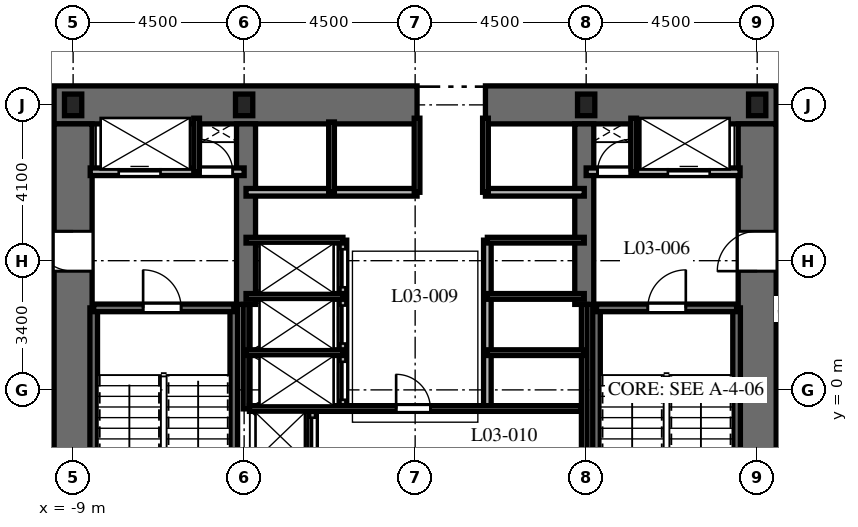
"""IFC4 building model, lengths in metres.
Left out: names, types, materials, properties, quantities, classifications, styles, units other than length and angle.
Written with IfcOpenShell. Run it as: python <this file> out.ifc"""

import sys

from ifc_helpers import new_model, si_unit, direction, frame, frame_2d, origin, origin_2d, place, context, subcontext, project, spatial, rectangle, i_section, extrude, element, fill, save


model = new_model("IFC4")
c1 = context("Model", 3, precision=1e-05, world=origin(), true_north=direction((0.0, 1.0)))
c2 = subcontext(c1, "Body", "Model", "MODEL_VIEW")
j1 = project(units=[si_unit("LENGTHUNIT", "METRE"), si_unit("PLANEANGLEUNIT", "RADIAN")], contexts=[c1])
p1 = place(None, origin())
s1 = spatial("IfcSite", under=j1, at=p1, CompositionType="ELEMENT")
p2 = place(p1, origin())
s2 = spatial("IfcBuilding", under=s1, at=p2, CompositionType="ELEMENT")
p3 = place(p2, frame((0.0, 0.0, 18.6)))
s3 = spatial("IfcBuildingStorey", under=s2, at=p3, CompositionType="ELEMENT", Elevation=18.6)
p4 = place(p3, frame((-9.5, 7.5, 0.0), z_axis=(0.0, 0.0, 1.0), x_axis=(1.0, 0.0, 0.0)))
e1 = element("IfcWall", 1, at=p4, inside=s3, PredefinedType="SHEAR", context=c2, shape_type="SweptSolid", body=[
    extrude(rectangle(XDim=9.55, YDim=1.0, at=frame_2d((4.775, 0.0))), origin(), (0.0, 0.0, 1.0), 4.8),
])
p5 = place(p3, frame((1.85, 7.5, 0.0), z_axis=(0.0, 0.0, 1.0), x_axis=(1.0, 0.0, 0.0)))
e2 = element("IfcWall", 2, at=p5, inside=s3, PredefinedType="SHEAR", context=c2, shape_type="SweptSolid", body=[
    extrude(rectangle(XDim=7.65, YDim=1.0, at=frame_2d((3.825, 0.0))), origin(), (0.0, 0.0, 1.0), 4.8),
])
p6 = place(p3, frame((-9.0, -7.0, 0.0), z_axis=(0.0, 0.0, 1.0), x_axis=(0.0, 1.0, 0.0)))
e3 = element("IfcWall", 3, at=p6, inside=s3, PredefinedType="SHEAR", context=c2, shape_type="SweptSolid", body=[
    extrude(rectangle(XDim=14.0, YDim=1.0, at=frame_2d((7.0, 0.0))), origin(), (0.0, 0.0, 1.0), 4.8),
])
p7 = place(p6, frame((10.125, 0.0, 0.0)))
e4 = element("IfcOpeningElement", 4, at=p7, cuts=e3, PredefinedType="OPENING", context=c2, shape_type="SweptSolid", body=[
    extrude(rectangle(XDim=1.05, YDim=2.15, at=frame_2d((0.525, 1.075))), frame((0.0, 0.51, 0.0), z_axis=(0.0, -1.0, 0.0), x_axis=(1.0, 0.0, 0.0)), (0.0, 0.0, 1.0), 1.02),
])
p8 = place(p3, frame((9.0, -7.0, 0.0), z_axis=(0.0, 0.0, 1.0), x_axis=(0.0, 1.0, 0.0)))
e5 = element("IfcWall", 5, at=p8, inside=s3, PredefinedType="SHEAR", context=c2, shape_type="SweptSolid", body=[
    extrude(rectangle(XDim=14.0, YDim=1.0, at=frame_2d((7.0, 0.0))), origin(), (0.0, 0.0, 1.0), 4.8),
])
p9 = place(p8, frame((10.125, 0.0, 0.0)))
e6 = element("IfcOpeningElement", 6, at=p9, cuts=e5, PredefinedType="OPENING", context=c2, shape_type="SweptSolid", body=[
    extrude(rectangle(XDim=1.05, YDim=2.15, at=frame_2d((0.525, 1.075))), frame((0.0, 0.51, 0.0), z_axis=(0.0, -1.0, 0.0), x_axis=(1.0, 0.0, 0.0)), (0.0, 0.0, 1.0), 1.02),
])
for number, where, z_axis, x_axis in (
    (7, (-4.45, 2.25, 0.0), (0.0, 0.0, 1.0), (0.0, 1.0, 0.0)),
    (8, (4.45, 2.25, 0.0), (0.0, 0.0, 1.0), (0.0, 1.0, 0.0)),
):
    element("IfcWall", number, at=place(p3, frame(where, z_axis=z_axis, x_axis=x_axis)), inside=s3, PredefinedType="SHEAR", context=c2, shape_type="SweptSolid", body=[
        extrude(rectangle(XDim=4.75, YDim=0.5, at=frame_2d((2.375, 0.0))), origin(), (0.0, 0.0, 1.0), 4.8),
    ])
for number, where, z_axis, x_axis in (
    (9, (-8.458, -6.985, 0.0), (0.0, 0.0, 1.0), (0.0, 1.0, 0.0)),
    (10, (-4.772, -6.985, 0.0), (0.0, 0.0, 1.0), (0.0, 1.0, 0.0)),
):
    element("IfcWall", number, at=place(p3, frame(where, z_axis=z_axis, x_axis=x_axis)), inside=s3, PredefinedType="SHEAR", context=c2, shape_type="SweptSolid", body=[
        extrude(rectangle(XDim=9.143, YDim=0.2, at=frame_2d((4.572, 0.0))), origin(), (0.0, 0.0, 1.0), 4.8),
    ])
p10 = place(p3, frame((-8.458, 2.158, 0.0), z_axis=(0.0, 0.0, 1.0), x_axis=(1.0, 0.0, 0.0)))
e11 = element("IfcWall", 11, at=p10, inside=s3, PredefinedType="SHEAR", context=c2, shape_type="SweptSolid", body=[
    extrude(rectangle(XDim=3.686, YDim=0.2, at=frame_2d((1.843, 0.0))), origin(), (0.0, 0.0, 1.0), 4.8),
])
p11 = place(p10, frame((1.3, 0.0, 0.0)))
e12 = element("IfcOpeningElement", 12, at=p11, cuts=e11, PredefinedType="OPENING", context=c2, shape_type="SweptSolid", body=[
    extrude(rectangle(XDim=1.0, YDim=2.15, at=frame_2d((0.5, 1.075))), frame((0.0, 0.11, 0.0), z_axis=(0.0, -1.0, 0.0), x_axis=(1.0, 0.0, 0.0)), (0.0, 0.0, 1.0), 0.22),
])
for number, where, z_axis, x_axis in (
    (13, (4.772, -6.985, 0.0), (0.0, 0.0, 1.0), (0.0, 1.0, 0.0)),
    (14, (8.458, -6.985, 0.0), (0.0, 0.0, 1.0), (0.0, 1.0, 0.0)),
):
    element("IfcWall", number, at=place(p3, frame(where, z_axis=z_axis, x_axis=x_axis)), inside=s3, PredefinedType="SHEAR", context=c2, shape_type="SweptSolid", body=[
        extrude(rectangle(XDim=9.143, YDim=0.2, at=frame_2d((4.572, 0.0))), origin(), (0.0, 0.0, 1.0), 4.8),
    ])
p12 = place(p3, frame((4.772, 2.158, 0.0), z_axis=(0.0, 0.0, 1.0), x_axis=(1.0, 0.0, 0.0)))
e15 = element("IfcWall", 15, at=p12, inside=s3, PredefinedType="SHEAR", context=c2, shape_type="SweptSolid", body=[
    extrude(rectangle(XDim=3.686, YDim=0.2, at=frame_2d((1.843, 0.0))), origin(), (0.0, 0.0, 1.0), 4.8),
])
p13 = place(p12, frame((1.35, 0.0, 0.0)))
e16 = element("IfcOpeningElement", 16, at=p13, cuts=e15, PredefinedType="OPENING", context=c2, shape_type="SweptSolid", body=[
    extrude(rectangle(XDim=1.0, YDim=2.15, at=frame_2d((0.5, 1.075))), frame((0.0, 0.11, 0.0), z_axis=(0.0, -1.0, 0.0), x_axis=(1.0, 0.0, 0.0)), (0.0, 0.0, 1.0), 0.22),
])
for number, where, z_axis, x_axis in (
    (17, (9.0, 7.5, 0.0), (0.0, 0.0, 1.0), (1.0, 0.0, 0.0)),
    (18, (4.5, 7.5, 0.0), (0.0, 0.0, 1.0), (1.0, 0.0, 0.0)),
    (19, (-4.5, 7.5, 0.0), (0.0, 0.0, 1.0), (1.0, 0.0, 0.0)),
    (20, (-9.0, 7.5, 0.0), (0.0, 0.0, 1.0), (1.0, 0.0, 0.0)),
):
    element("IfcColumn", number, at=place(p3, frame(where, z_axis=z_axis, x_axis=x_axis)), inside=s3, PredefinedType="COLUMN", context=c2, shape_type="SweptSolid", body=[
        extrude(i_section(OverallWidth=0.454, OverallDepth=0.569, WebThickness=0.078, FlangeThickness=0.125, at=origin_2d()), origin(), (0.0, 0.0, 1.0), 4.8),
    ])
p14 = place(p3, frame((-8.55, 5.74, 0.0), z_axis=(0.0, 0.0, 1.0), x_axis=(1.0, 0.0, 0.0)))
e21 = element("IfcWall", 21, at=p14, inside=s3, PredefinedType="PARTITIONING", context=c2, shape_type="SweptSolid", body=[
    extrude(rectangle(XDim=4.05, YDim=0.2, at=frame_2d((2.025, 0.0))), origin(), (0.0, 0.0, 1.0), 4.48),
])
p15 = place(p14, frame((0.75, 0.0, 0.0)))
e22 = element("IfcOpeningElement", 22, at=p15, cuts=e21, PredefinedType="OPENING", context=c2, shape_type="SweptSolid", body=[
    extrude(rectangle(XDim=1.1, YDim=2.2, at=frame_2d((0.55, 1.1))), frame((0.0, 0.11, 0.0), z_axis=(0.0, -1.0, 0.0), x_axis=(1.0, 0.0, 0.0)), (0.0, 0.0, 1.0), 0.22),
])
p16 = place(p14, frame((2.9, 0.0, 0.0)))
e23 = element("IfcOpeningElement", 23, at=p16, cuts=e21, PredefinedType="OPENING", context=c2, shape_type="SweptSolid", body=[
    extrude(rectangle(XDim=0.85, YDim=2.03, at=frame_2d((0.425, 1.015))), frame((0.0, 0.11, 0.0), z_axis=(0.0, -1.0, 0.0), x_axis=(1.0, 0.0, 0.0)), (0.0, 0.0, 1.0), 0.22),
])
p17 = place(p3, frame((-5.75, 5.74, 0.0), z_axis=(0.0, 0.0, 1.0), x_axis=(0.0, 1.0, 0.0)))
e24 = element("IfcWall", 24, at=p17, inside=s3, PredefinedType="PARTITIONING", context=c2, shape_type="SweptSolid", body=[
    extrude(rectangle(XDim=1.41, YDim=0.15, at=frame_2d((0.705, 0.0))), origin(), (0.0, 0.0, 1.0), 4.48),
])
p18 = place(p3, frame((4.5, 5.74, 0.0), z_axis=(0.0, 0.0, 1.0), x_axis=(1.0, 0.0, 0.0)))
e25 = element("IfcWall", 25, at=p18, inside=s3, PredefinedType="PARTITIONING", context=c2, shape_type="SweptSolid", body=[
    extrude(rectangle(XDim=4.05, YDim=0.2, at=frame_2d((2.025, 0.0))), origin(), (0.0, 0.0, 1.0), 4.48),
])
p19 = place(p18, frame((0.3, 0.0, 0.0)))
e26 = element("IfcOpeningElement", 26, at=p19, cuts=e25, PredefinedType="OPENING", context=c2, shape_type="SweptSolid", body=[
    extrude(rectangle(XDim=0.85, YDim=2.03, at=frame_2d((0.425, 1.015))), frame((0.0, 0.11, 0.0), z_axis=(0.0, -1.0, 0.0), x_axis=(1.0, 0.0, 0.0)), (0.0, 0.0, 1.0), 0.22),
])
p20 = place(p18, frame((2.15, 0.0, 0.0)))
e27 = element("IfcOpeningElement", 27, at=p20, cuts=e25, PredefinedType="OPENING", context=c2, shape_type="SweptSolid", body=[
    extrude(rectangle(XDim=1.1, YDim=2.2, at=frame_2d((0.55, 1.1))), frame((0.0, 0.11, 0.0), z_axis=(0.0, -1.0, 0.0), x_axis=(1.0, 0.0, 0.0)), (0.0, 0.0, 1.0), 0.22),
])
p21 = place(p3, frame((5.75, 5.74, 0.0), z_axis=(0.0, 0.0, 1.0), x_axis=(0.0, 1.0, 0.0)))
e28 = element("IfcWall", 28, at=p21, inside=s3, PredefinedType="PARTITIONING", context=c2, shape_type="SweptSolid", body=[
    extrude(rectangle(XDim=1.41, YDim=0.15, at=frame_2d((0.705, 0.0))), origin(), (0.0, 0.0, 1.0), 4.48),
])
p22 = place(p3, frame((-2.7, -1.972, 0.0), z_axis=(0.0, 0.0, 1.0), x_axis=(0.0, 1.0, 0.0)))
e29 = element("IfcWall", 29, at=p22, inside=s3, PredefinedType="PARTITIONING", context=c2, shape_type="SweptSolid", body=[
    extrude(rectangle(XDim=1.472, YDim=0.2, at=frame_2d((0.736, 0.0))), origin(), (0.0, 0.0, 1.0), 4.48),
])
p23 = place(p22, frame((0.24, 0.0, 0.0)))
e30 = element("IfcOpeningElement", 30, at=p23, cuts=e29, PredefinedType="OPENING", context=c2, shape_type="SweptSolid", body=[
    extrude(rectangle(XDim=1.0, YDim=2.2, at=frame_2d((0.5, 1.1))), frame((0.0, 0.11, 0.0), z_axis=(0.0, -1.0, 0.0), x_axis=(1.0, 0.0, 0.0)), (0.0, 0.0, 1.0), 0.22),
])
p24 = place(p3, frame((-4.45, 5.2, 0.0), z_axis=(0.0, 0.0, 1.0), x_axis=(1.0, 0.0, 0.0)))
e31 = element("IfcWall", 31, at=p24, inside=s3, PredefinedType="PARTITIONING", context=c2, shape_type="SweptSolid", body=[
    extrude(rectangle(XDim=4.5, YDim=0.2, at=frame_2d((2.25, 0.0))), origin(), (0.0, 0.0, 1.0), 4.48),
])
p25 = place(p3, frame((1.85, 5.2, 0.0), z_axis=(0.0, 0.0, 1.0), x_axis=(1.0, 0.0, 0.0)))
e32 = element("IfcWall", 32, at=p25, inside=s3, PredefinedType="PARTITIONING", context=c2, shape_type="SweptSolid", body=[
    extrude(rectangle(XDim=2.6, YDim=0.2, at=frame_2d((1.3, 0.0))), origin(), (0.0, 0.0, 1.0), 4.48),
])
p26 = place(p3, frame((-2.2, 5.2, 0.0), z_axis=(0.0, 0.0, 1.0), x_axis=(0.0, 1.0, 0.0)))
e33 = element("IfcWall", 33, at=p26, inside=s3, PredefinedType="PARTITIONING", context=c2, shape_type="SweptSolid", body=[
    extrude(rectangle(XDim=1.85, YDim=0.15, at=frame_2d((0.925, 0.0))), origin(), (0.0, 0.0, 1.0), 4.48),
])
for number, where, z_axis, x_axis in (
    (34, (0.05, 5.2, 0.0), (0.0, 0.0, 1.0), (0.0, 1.0, 0.0)),
    (35, (1.85, 5.2, 0.0), (0.0, 0.0, 1.0), (0.0, 1.0, 0.0)),
):
    element("IfcWall", number, at=place(p3, frame(where, z_axis=z_axis, x_axis=x_axis)), inside=s3, PredefinedType="PARTITIONING", context=c2, shape_type="SweptSolid", body=[
        extrude(rectangle(XDim=1.95, YDim=0.15, at=frame_2d((0.975, 0.0))), origin(), (0.0, 0.0, 1.0), 4.48),
    ])
p27 = place(p3, frame((-4.45, -0.5, 0.0), z_axis=(0.0, 0.0, 1.0), x_axis=(0.0, 1.0, 0.0)))
e36 = element("IfcWall", 36, at=p27, inside=s3, PredefinedType="PARTITIONING", context=c2, shape_type="SweptSolid", body=[
    extrude(rectangle(XDim=2.75, YDim=0.15, at=frame_2d((1.375, 0.0))), origin(), (0.0, 0.0, 1.0), 4.48),
])
p28 = place(p3, frame((4.45, -1.972, 0.0), z_axis=(0.0, 0.0, 1.0), x_axis=(0.0, 1.0, 0.0)))
e37 = element("IfcWall", 37, at=p28, inside=s3, PredefinedType="PARTITIONING", context=c2, shape_type="SweptSolid", body=[
    extrude(rectangle(XDim=4.222, YDim=0.15, at=frame_2d((2.111, 0.0))), origin(), (0.0, 0.0, 1.0), 4.48),
])
p29 = place(p3, frame((-1.9, -0.5, 0.0), z_axis=(0.0, 0.0, 1.0), x_axis=(0.0, 1.0, 0.0)))
e38 = element("IfcWall", 38, at=p29, inside=s3, PredefinedType="PARTITIONING", context=c2, shape_type="SweptSolid", body=[
    extrude(rectangle(XDim=4.44, YDim=0.2, at=frame_2d((2.22, 0.0))), origin(), (0.0, 0.0, 1.0), 4.48),
])
p30 = place(p29, frame((0.24, 0.0, 0.0)))
e39 = element("IfcOpeningElement", 39, at=p30, cuts=e38, PredefinedType="OPENING", context=c2, shape_type="SweptSolid", body=[
    extrude(rectangle(XDim=1.0, YDim=2.2, at=frame_2d((0.5, 1.1))), frame((0.0, 0.11, 0.0), z_axis=(0.0, -1.0, 0.0), x_axis=(1.0, 0.0, 0.0)), (0.0, 0.0, 1.0), 0.22),
])
p31 = place(p29, frame((1.72, 0.0, 0.0)))
e40 = element("IfcOpeningElement", 40, at=p31, cuts=e38, PredefinedType="OPENING", context=c2, shape_type="SweptSolid", body=[
    extrude(rectangle(XDim=1.0, YDim=2.2, at=frame_2d((0.5, 1.1))), frame((0.0, 0.11, 0.0), z_axis=(0.0, -1.0, 0.0), x_axis=(1.0, 0.0, 0.0)), (0.0, 0.0, 1.0), 0.22),
])
p32 = place(p29, frame((3.2, 0.0, 0.0)))
e41 = element("IfcOpeningElement", 41, at=p32, cuts=e38, PredefinedType="OPENING", context=c2, shape_type="SweptSolid", body=[
    extrude(rectangle(XDim=1.0, YDim=2.2, at=frame_2d((0.5, 1.1))), frame((0.0, 0.11, 0.0), z_axis=(0.0, -1.0, 0.0), x_axis=(1.0, 0.0, 0.0)), (0.0, 0.0, 1.0), 0.22),
])
for number, where, z_axis, x_axis in (
    (42, (-4.45, 3.94, 0.0), (0.0, 0.0, 1.0), (1.0, 0.0, 0.0)),
    (43, (-4.45, 0.98, 0.0), (0.0, 0.0, 1.0), (1.0, 0.0, 0.0)),
    (44, (-4.45, 2.46, 0.0), (0.0, 0.0, 1.0), (1.0, 0.0, 0.0)),
):
    element("IfcWall", number, at=place(p3, frame(where, z_axis=z_axis, x_axis=x_axis)), inside=s3, PredefinedType="PARTITIONING", context=c2, shape_type="SweptSolid", body=[
        extrude(rectangle(XDim=2.55, YDim=0.15, at=frame_2d((1.275, 0.0))), origin(), (0.0, 0.0, 1.0), 4.48),
    ])
p33 = place(p3, frame((1.9, -0.5, 0.0), z_axis=(0.0, 0.0, 1.0), x_axis=(0.0, 1.0, 0.0)))
e45 = element("IfcWall", 45, at=p33, inside=s3, PredefinedType="PARTITIONING", context=c2, shape_type="SweptSolid", body=[
    extrude(rectangle(XDim=4.44, YDim=0.2, at=frame_2d((2.22, 0.0))), origin(), (0.0, 0.0, 1.0), 4.48),
])
for number, where, z_axis, x_axis in (
    (46, (1.9, 3.94, 0.0), (0.0, 0.0, 1.0), (1.0, 0.0, 0.0)),
    (47, (1.9, 0.98, 0.0), (0.0, 0.0, 1.0), (1.0, 0.0, 0.0)),
    (48, (1.9, 2.46, 0.0), (0.0, 0.0, 1.0), (1.0, 0.0, 0.0)),
):
    element("IfcWall", number, at=place(p3, frame(where, z_axis=z_axis, x_axis=x_axis)), inside=s3, PredefinedType="PARTITIONING", context=c2, shape_type="SweptSolid", body=[
        extrude(rectangle(XDim=2.55, YDim=0.15, at=frame_2d((1.275, 0.0))), origin(), (0.0, 0.0, 1.0), 4.48),
    ])
p34 = place(p3, frame((-4.36, -0.49, 0.0), z_axis=(0.0, 0.0, 1.0), x_axis=(1.0, 0.0, 0.0)))
e49 = element("IfcWall", 49, at=p34, inside=s3, PredefinedType="PARTITIONING", context=c2, shape_type="SweptSolid", body=[
    extrude(rectangle(XDim=8.72, YDim=0.15, at=frame_2d((4.36, 0.0))), origin(), (0.0, 0.0, 1.0), 4.48),
])
p35 = place(p34, frame((3.86, 0.0, 0.0)))
e50 = element("IfcOpeningElement", 50, at=p35, cuts=e49, PredefinedType="OPENING", context=c2, shape_type="SweptSolid", body=[
    extrude(rectangle(XDim=0.9, YDim=2.03, at=frame_2d((0.45, 1.015))), frame((0.0, 0.085, 0.0), z_axis=(0.0, -1.0, 0.0), x_axis=(1.0, 0.0, 0.0)), (0.0, 0.0, 1.0), 0.17),
])
p36 = place(p11, origin())
e51 = element("IfcDoor", 51, at=p36, inside=s3, OperationType="SINGLE_SWING_LEFT", PredefinedType="DOOR", context=c2, shape_type="SweptSolid", body=[
    extrude(rectangle(XDim=1.0, YDim=2.15, at=frame_2d((0.5, 1.075))), frame((0.0, 0.025, 0.0), z_axis=(0.0, -1.0, 0.0), x_axis=(1.0, 0.0, 0.0)), (0.0, 0.0, 1.0), 0.05),
])
fill(e12, e51)
p37 = place(p13, origin())
e52 = element("IfcDoor", 52, at=p37, inside=s3, OperationType="SINGLE_SWING_RIGHT", PredefinedType="DOOR", context=c2, shape_type="SweptSolid", body=[
    extrude(rectangle(XDim=1.0, YDim=2.15, at=frame_2d((0.5, 1.075))), frame((0.0, 0.025, 0.0), z_axis=(0.0, -1.0, 0.0), x_axis=(1.0, 0.0, 0.0)), (0.0, 0.0, 1.0), 0.05),
])
fill(e16, e52)
p38 = place(p7, origin())
e53 = element("IfcDoor", 53, at=p38, inside=s3, OperationType="SINGLE_SWING_RIGHT", PredefinedType="DOOR", context=c2, shape_type="SweptSolid", body=[
    extrude(rectangle(XDim=1.05, YDim=2.15, at=frame_2d((0.525, 1.075))), frame((0.0, 0.025, 0.0), z_axis=(0.0, -1.0, 0.0), x_axis=(1.0, 0.0, 0.0)), (0.0, 0.0, 1.0), 0.05),
])
fill(e4, e53)
p39 = place(p9, origin())
e54 = element("IfcDoor", 54, at=p39, inside=s3, OperationType="SINGLE_SWING_LEFT", PredefinedType="DOOR", context=c2, shape_type="SweptSolid", body=[
    extrude(rectangle(XDim=1.05, YDim=2.15, at=frame_2d((0.525, 1.075))), frame((0.0, 0.025, 0.0), z_axis=(0.0, -1.0, 0.0), x_axis=(1.0, 0.0, 0.0)), (0.0, 0.0, 1.0), 0.05),
])
fill(e6, e54)
p40 = place(p15, origin())
e55 = element("IfcDoor", 55, at=p40, inside=s3, OperationType="SLIDING_TO_LEFT", PredefinedType="DOOR", context=c2, shape_type="SweptSolid", body=[
    extrude(rectangle(XDim=1.1, YDim=2.2, at=frame_2d((0.55, 1.1))), frame((0.0, 0.025, 0.0), z_axis=(0.0, -1.0, 0.0), x_axis=(1.0, 0.0, 0.0)), (0.0, 0.0, 1.0), 0.05),
])
fill(e22, e55)
p41 = place(p16, origin())
e56 = element("IfcDoor", 56, at=p41, inside=s3, OperationType="SINGLE_SWING_LEFT", PredefinedType="DOOR", context=c2, shape_type="SweptSolid", body=[
    extrude(rectangle(XDim=0.85, YDim=2.03, at=frame_2d((0.425, 1.015))), frame((0.0, 0.025, 0.0), z_axis=(0.0, -1.0, 0.0), x_axis=(1.0, 0.0, 0.0)), (0.0, 0.0, 1.0), 0.05),
])
fill(e23, e56)
p42 = place(p19, origin())
e57 = element("IfcDoor", 57, at=p42, inside=s3, OperationType="SINGLE_SWING_RIGHT", PredefinedType="DOOR", context=c2, shape_type="SweptSolid", body=[
    extrude(rectangle(XDim=0.85, YDim=2.03, at=frame_2d((0.425, 1.015))), frame((0.0, 0.025, 0.0), z_axis=(0.0, -1.0, 0.0), x_axis=(1.0, 0.0, 0.0)), (0.0, 0.0, 1.0), 0.05),
])
fill(e26, e57)
p43 = place(p20, origin())
e58 = element("IfcDoor", 58, at=p43, inside=s3, OperationType="SLIDING_TO_RIGHT", PredefinedType="DOOR", context=c2, shape_type="SweptSolid", body=[
    extrude(rectangle(XDim=1.1, YDim=2.2, at=frame_2d((0.55, 1.1))), frame((0.0, 0.025, 0.0), z_axis=(0.0, -1.0, 0.0), x_axis=(1.0, 0.0, 0.0)), (0.0, 0.0, 1.0), 0.05),
])
fill(e27, e58)
p44 = place(p23, origin())
e59 = element("IfcDoor", 59, at=p44, inside=s3, OperationType="SLIDING_TO_LEFT", PredefinedType="DOOR", context=c2, shape_type="SweptSolid", body=[
    extrude(rectangle(XDim=1.0, YDim=2.2, at=frame_2d((0.5, 1.1))), frame((0.0, 0.025, 0.0), z_axis=(0.0, -1.0, 0.0), x_axis=(1.0, 0.0, 0.0)), (0.0, 0.0, 1.0), 0.05),
])
fill(e30, e59)
p45 = place(p30, origin())
e60 = element("IfcDoor", 60, at=p45, inside=s3, OperationType="SLIDING_TO_LEFT", PredefinedType="DOOR", context=c2, shape_type="SweptSolid", body=[
    extrude(rectangle(XDim=1.0, YDim=2.2, at=frame_2d((0.5, 1.1))), frame((0.0, 0.025, 0.0), z_axis=(0.0, -1.0, 0.0), x_axis=(1.0, 0.0, 0.0)), (0.0, 0.0, 1.0), 0.05),
])
fill(e39, e60)
p46 = place(p31, origin())
e61 = element("IfcDoor", 61, at=p46, inside=s3, OperationType="SLIDING_TO_LEFT", PredefinedType="DOOR", context=c2, shape_type="SweptSolid", body=[
    extrude(rectangle(XDim=1.0, YDim=2.2, at=frame_2d((0.5, 1.1))), frame((0.0, 0.025, 0.0), z_axis=(0.0, -1.0, 0.0), x_axis=(1.0, 0.0, 0.0)), (0.0, 0.0, 1.0), 0.05),
])
fill(e40, e61)
p47 = place(p32, origin())
e62 = element("IfcDoor", 62, at=p47, inside=s3, OperationType="SLIDING_TO_LEFT", PredefinedType="DOOR", context=c2, shape_type="SweptSolid", body=[
    extrude(rectangle(XDim=1.0, YDim=2.2, at=frame_2d((0.5, 1.1))), frame((0.0, 0.025, 0.0), z_axis=(0.0, -1.0, 0.0), x_axis=(1.0, 0.0, 0.0)), (0.0, 0.0, 1.0), 0.05),
])
fill(e41, e62)
p48 = place(p35, origin())
e63 = element("IfcDoor", 63, at=p48, inside=s3, OperationType="SINGLE_SWING_LEFT", PredefinedType="DOOR", context=c2, shape_type="SweptSolid", body=[
    extrude(rectangle(XDim=0.9, YDim=2.03, at=frame_2d((0.45, 1.015))), frame((0.0, 0.025, 0.0), z_axis=(0.0, -1.0, 0.0), x_axis=(1.0, 0.0, 0.0)), (0.0, 0.0, 1.0), 0.05),
])
fill(e50, e63)
save(model, sys.argv[1])
